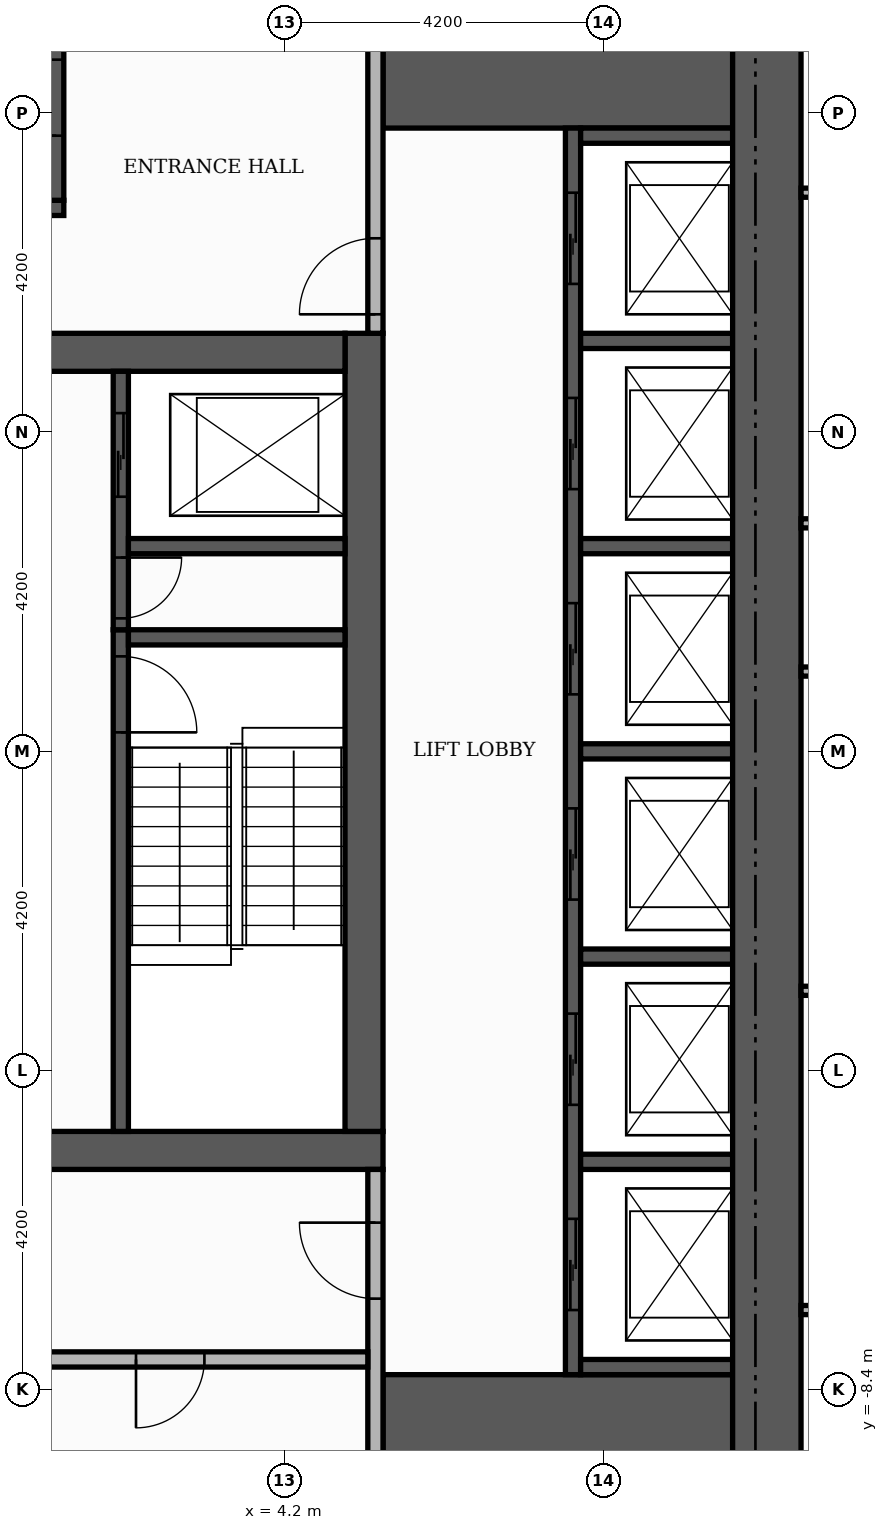
"""IFC4 building model, lengths in metres.
Left out: names, types, materials, properties, quantities, classifications, styles, units other than length and angle.
Written with IfcOpenShell. Run it as: python <this file> out.ifc"""

import sys

from ifc_helpers import new_model, si_unit, direction, frame, frame_2d, origin, place, context, subcontext, project, spatial, rectangle, extrude, element, fill, save


model = new_model("IFC4")
c1 = context("Model", 3, precision=1e-05, world=origin(), true_north=direction((0.0, 1.0)))
c2 = subcontext(c1, "Body", "Model", "MODEL_VIEW")
j1 = project(units=[si_unit("LENGTHUNIT", "METRE"), si_unit("PLANEANGLEUNIT", "RADIAN")], contexts=[c1])
p1 = place(None, origin())
s1 = spatial("IfcSite", under=j1, at=p1, CompositionType="ELEMENT")
p2 = place(p1, origin())
s2 = spatial("IfcBuilding", under=s1, at=p2, CompositionType="ELEMENT")
p3 = place(p2, frame((0.0, 0.0, 200.1)))
s3 = spatial("IfcBuildingStorey", under=s2, at=p3, CompositionType="ELEMENT", Elevation=200.1)
p4 = place(p3, frame((-5.5, -5.25, 0.0), z_axis=(0.0, 0.0, 1.0), x_axis=(1.0, 0.0, 0.0)))
e1 = element("IfcWall", 1, at=p4, inside=s3, PredefinedType="SHEAR", context=c2, shape_type="SweptSolid", body=[
    extrude(rectangle(XDim=11.0, YDim=0.5, at=frame_2d((5.5, 0.0))), origin(), (0.0, 0.0, 1.0), 3.48),
])
p5 = place(p4, frame((4.9, 0.0, 0.0)))
e2 = element("IfcOpeningElement", 2, at=p5, cuts=e1, PredefinedType="OPENING", context=c2, shape_type="SweptSolid", body=[
    extrude(rectangle(XDim=1.2, YDim=2.1, at=frame_2d((0.6, 1.05))), frame((0.0, 0.26, 0.0), z_axis=(0.0, -1.0, 0.0), x_axis=(1.0, 0.0, 0.0)), (0.0, 0.0, 1.0), 0.52),
])
p6 = place(p3, frame((5.25, -5.0, 0.0), z_axis=(0.0, 0.0, 1.0), x_axis=(0.0, 1.0, 0.0)))
e3 = element("IfcWall", 3, at=p6, inside=s3, PredefinedType="SHEAR", context=c2, shape_type="SweptSolid", body=[
    extrude(rectangle(XDim=10.5, YDim=0.5, at=frame_2d((5.25, 0.0))), origin(), (0.0, 0.0, 1.0), 3.48),
])
p7 = place(p3, frame((-5.0, 5.25, 0.0), z_axis=(0.0, 0.0, 1.0), x_axis=(1.0, 0.0, 0.0)))
e4 = element("IfcWall", 4, at=p7, inside=s3, PredefinedType="SHEAR", context=c2, shape_type="SweptSolid", body=[
    extrude(rectangle(XDim=10.0, YDim=0.5, at=frame_2d((5.0, 0.0))), origin(), (0.0, 0.0, 1.0), 3.48),
])
p8 = place(p7, frame((4.4, 0.0, 0.0)))
e5 = element("IfcOpeningElement", 5, at=p8, cuts=e4, PredefinedType="OPENING", context=c2, shape_type="SweptSolid", body=[
    extrude(rectangle(XDim=1.2, YDim=2.1, at=frame_2d((0.6, 1.05))), frame((0.0, 0.26, 0.0), z_axis=(0.0, -1.0, 0.0), x_axis=(1.0, 0.0, 0.0)), (0.0, 0.0, 1.0), 0.52),
])
for number, where, z_axis, x_axis in (
    (6, (5.5, -9.15, 0.0), (0.0, 0.0, 1.0), (1.0, 0.0, 0.0)),
    (7, (5.5, 9.15, 0.0), (0.0, 0.0, 1.0), (1.0, 0.0, 0.0)),
):
    element("IfcWall", number, at=place(p3, frame(where, z_axis=z_axis, x_axis=x_axis)), inside=s3, PredefinedType="SHEAR", context=c2, shape_type="SweptSolid", body=[
        extrude(rectangle(XDim=4.6, YDim=1.9, at=frame_2d((2.3, 0.0))), origin(), (0.0, 0.0, 1.0), 3.48),
    ])
p9 = place(p3, frame((2.05, -5.0, 0.0), z_axis=(0.0, 0.0, 1.0), x_axis=(0.0, 1.0, 0.0)))
e8 = element("IfcWall", 8, at=p9, inside=s3, PredefinedType="SHEAR", context=c2, shape_type="SweptSolid", body=[
    extrude(rectangle(XDim=6.6, YDim=0.2, at=frame_2d((3.3, 0.0))), origin(), (0.0, 0.0, 1.0), 3.48),
])
p10 = place(p9, frame((5.25, 0.0, 0.0)))
e9 = element("IfcOpeningElement", 9, at=p10, cuts=e8, PredefinedType="OPENING", context=c2, shape_type="SweptSolid", body=[
    extrude(rectangle(XDim=1.0, YDim=2.1, at=frame_2d((0.5, 1.05))), frame((0.0, 0.11, 0.0), z_axis=(0.0, -1.0, 0.0), x_axis=(1.0, 0.0, 0.0)), (0.0, 0.0, 1.0), 0.22),
])
p11 = place(p3, frame((2.15, 1.5, 0.0), z_axis=(0.0, 0.0, 1.0), x_axis=(1.0, 0.0, 0.0)))
e10 = element("IfcWall", 10, at=p11, inside=s3, PredefinedType="SHEAR", context=c2, shape_type="SweptSolid", body=[
    extrude(rectangle(XDim=2.85, YDim=0.2, at=frame_2d((1.425, 0.0))), origin(), (0.0, 0.0, 1.0), 3.48),
])
p12 = place(p3, frame((-5.5, 7.15, 0.0), z_axis=(0.0, 0.0, 1.0), x_axis=(1.0, 0.0, 0.0)))
e11 = element("IfcWall", 11, at=p12, inside=s3, PredefinedType="SHEAR", context=c2, shape_type="SweptSolid", body=[
    extrude(rectangle(XDim=6.8, YDim=0.2, at=frame_2d((3.4, 0.0))), origin(), (0.0, 0.0, 1.0), 3.48),
])
p13 = place(p3, frame((1.2, 7.25, 0.0), z_axis=(0.0, 0.0, 1.0), x_axis=(0.0, 1.0, 0.0)))
e12 = element("IfcWall", 12, at=p13, inside=s3, PredefinedType="SHEAR", context=c2, shape_type="SweptSolid", body=[
    extrude(rectangle(XDim=2.85, YDim=0.2, at=frame_2d((1.425, 0.0))), origin(), (0.0, 0.0, 1.0), 3.48),
])
p14 = place(p13, frame((0.85, 0.0, 0.0)))
e13 = element("IfcOpeningElement", 13, at=p14, cuts=e12, PredefinedType="OPENING", context=c2, shape_type="SweptSolid", body=[
    extrude(rectangle(XDim=1.0, YDim=2.1, at=frame_2d((0.5, 1.05))), frame((0.0, 0.11, 0.0), z_axis=(0.0, -1.0, 0.0), x_axis=(1.0, 0.0, 0.0)), (0.0, 0.0, 1.0), 0.22),
])
p15 = place(p3, frame((8.0, -8.2, 0.0), z_axis=(0.0, 0.0, 1.0), x_axis=(0.0, 1.0, 0.0)))
e14 = element("IfcWall", 14, at=p15, inside=s3, PredefinedType="SHEAR", context=c2, shape_type="SweptSolid", body=[
    extrude(rectangle(XDim=16.4, YDim=0.2, at=frame_2d((8.2, 0.0))), origin(), (0.0, 0.0, 1.0), 3.48),
])
p16 = place(p15, frame((0.85, 0.0, 0.0)))
e15 = element("IfcOpeningElement", 15, at=p16, cuts=e14, PredefinedType="OPENING", context=c2, shape_type="SweptSolid", body=[
    extrude(rectangle(XDim=1.2, YDim=2.1, at=frame_2d((0.6, 1.05))), frame((0.0, 0.11, 0.0), z_axis=(0.0, -1.0, 0.0), x_axis=(1.0, 0.0, 0.0)), (0.0, 0.0, 1.0), 0.22),
])
p17 = place(p15, frame((3.55, 0.0, 0.0)))
e16 = element("IfcOpeningElement", 16, at=p17, cuts=e14, PredefinedType="OPENING", context=c2, shape_type="SweptSolid", body=[
    extrude(rectangle(XDim=1.2, YDim=2.1, at=frame_2d((0.6, 1.05))), frame((0.0, 0.11, 0.0), z_axis=(0.0, -1.0, 0.0), x_axis=(1.0, 0.0, 0.0)), (0.0, 0.0, 1.0), 0.22),
])
p18 = place(p15, frame((6.25, 0.0, 0.0)))
e17 = element("IfcOpeningElement", 17, at=p18, cuts=e14, PredefinedType="OPENING", context=c2, shape_type="SweptSolid", body=[
    extrude(rectangle(XDim=1.2, YDim=2.1, at=frame_2d((0.6, 1.05))), frame((0.0, 0.11, 0.0), z_axis=(0.0, -1.0, 0.0), x_axis=(1.0, 0.0, 0.0)), (0.0, 0.0, 1.0), 0.22),
])
p19 = place(p15, frame((8.95, 0.0, 0.0)))
e18 = element("IfcOpeningElement", 18, at=p19, cuts=e14, PredefinedType="OPENING", context=c2, shape_type="SweptSolid", body=[
    extrude(rectangle(XDim=1.2, YDim=2.1, at=frame_2d((0.6, 1.05))), frame((0.0, 0.11, 0.0), z_axis=(0.0, -1.0, 0.0), x_axis=(1.0, 0.0, 0.0)), (0.0, 0.0, 1.0), 0.22),
])
p20 = place(p15, frame((11.65, 0.0, 0.0)))
e19 = element("IfcOpeningElement", 19, at=p20, cuts=e14, PredefinedType="OPENING", context=c2, shape_type="SweptSolid", body=[
    extrude(rectangle(XDim=1.2, YDim=2.1, at=frame_2d((0.6, 1.05))), frame((0.0, 0.11, 0.0), z_axis=(0.0, -1.0, 0.0), x_axis=(1.0, 0.0, 0.0)), (0.0, 0.0, 1.0), 0.22),
])
p21 = place(p15, frame((14.35, 0.0, 0.0)))
e20 = element("IfcOpeningElement", 20, at=p21, cuts=e14, PredefinedType="OPENING", context=c2, shape_type="SweptSolid", body=[
    extrude(rectangle(XDim=1.2, YDim=2.1, at=frame_2d((0.6, 1.05))), frame((0.0, 0.11, 0.0), z_axis=(0.0, -1.0, 0.0), x_axis=(1.0, 0.0, 0.0)), (0.0, 0.0, 1.0), 0.22),
])
for number, where, z_axis, x_axis in (
    (21, (8.1, -8.1, 0.0), (0.0, 0.0, 1.0), (1.0, 0.0, 0.0)),
    (22, (8.1, -5.4, 0.0), (0.0, 0.0, 1.0), (1.0, 0.0, 0.0)),
    (23, (8.1, -2.7, 0.0), (0.0, 0.0, 1.0), (1.0, 0.0, 0.0)),
    (24, (8.1, 0.0, 0.0), (0.0, 0.0, 1.0), (1.0, 0.0, 0.0)),
):
    element("IfcWall", number, at=place(p3, frame(where, z_axis=z_axis, x_axis=x_axis)), inside=s3, PredefinedType="SHEAR", context=c2, shape_type="SweptSolid", body=[
        extrude(rectangle(XDim=2.0, YDim=0.2, at=frame_2d((1.0, 0.0))), origin(), (0.0, 0.0, 1.0), 3.48),
    ])
p22 = place(p3, frame((2.05, 1.6, 0.0), z_axis=(0.0, 0.0, 1.0), x_axis=(0.0, 1.0, 0.0)))
e25 = element("IfcWall", 25, at=p22, inside=s3, PredefinedType="SHEAR", context=c2, shape_type="SweptSolid", body=[
    extrude(rectangle(XDim=3.4, YDim=0.2, at=frame_2d((1.7, 0.0))), origin(), (0.0, 0.0, 1.0), 3.48),
])
p23 = place(p22, frame((1.75, 0.0, 0.0)))
e26 = element("IfcOpeningElement", 26, at=p23, cuts=e25, PredefinedType="OPENING", context=c2, shape_type="SweptSolid", body=[
    extrude(rectangle(XDim=1.1, YDim=2.1, at=frame_2d((0.55, 1.05))), frame((0.0, 0.11, 0.0), z_axis=(0.0, -1.0, 0.0), x_axis=(1.0, 0.0, 0.0)), (0.0, 0.0, 1.0), 0.22),
])
p24 = place(p22, frame((0.15, 0.0, 0.0)))
e27 = element("IfcOpeningElement", 27, at=p24, cuts=e25, PredefinedType="OPENING", context=c2, shape_type="SweptSolid", body=[
    extrude(rectangle(XDim=0.8, YDim=2.1, at=frame_2d((0.4, 1.05))), frame((0.0, 0.11, 0.0), z_axis=(0.0, -1.0, 0.0), x_axis=(1.0, 0.0, 0.0)), (0.0, 0.0, 1.0), 0.22),
])
p25 = place(p3, frame((2.15, 2.7, 0.0), z_axis=(0.0, 0.0, 1.0), x_axis=(1.0, 0.0, 0.0)))
e28 = element("IfcWall", 28, at=p25, inside=s3, PredefinedType="SHEAR", context=c2, shape_type="SweptSolid", body=[
    extrude(rectangle(XDim=2.85, YDim=0.2, at=frame_2d((1.425, 0.0))), origin(), (0.0, 0.0, 1.0), 3.48),
])
for number, where, z_axis, x_axis in (
    (29, (8.1, 2.7, 0.0), (0.0, 0.0, 1.0), (1.0, 0.0, 0.0)),
    (30, (8.1, 5.4, 0.0), (0.0, 0.0, 1.0), (1.0, 0.0, 0.0)),
    (31, (8.1, 8.1, 0.0), (0.0, 0.0, 1.0), (1.0, 0.0, 0.0)),
):
    element("IfcWall", number, at=place(p3, frame(where, z_axis=z_axis, x_axis=x_axis)), inside=s3, PredefinedType="SHEAR", context=c2, shape_type="SweptSolid", body=[
        extrude(rectangle(XDim=2.0, YDim=0.2, at=frame_2d((1.0, 0.0))), origin(), (0.0, 0.0, 1.0), 3.48),
    ])
p26 = place(p3, frame((10.55, -10.1, 0.0), z_axis=(0.0, 0.0, 1.0), x_axis=(0.0, 1.0, 0.0)))
e32 = element("IfcWall", 32, at=p26, inside=s3, PredefinedType="SHEAR", context=c2, shape_type="SweptSolid", body=[
    extrude(rectangle(XDim=20.2, YDim=0.9, at=frame_2d((10.1, 0.0))), origin(), (0.0, 0.0, 1.0), 3.48),
])
p27 = place(p3, frame((5.4, -10.1, 0.0), z_axis=(0.0, 0.0, 1.0), x_axis=(0.0, 1.0, 0.0)))
e33 = element("IfcWall", 33, at=p27, inside=s3, PredefinedType="PARTITIONING", context=c2, shape_type="SweptSolid", body=[
    extrude(rectangle(XDim=4.6, YDim=0.2, at=frame_2d((2.3, 0.0))), origin(), (0.0, 0.0, 1.0), 3.48),
])
p28 = place(p27, frame((2.9, 0.0, 0.0)))
e34 = element("IfcOpeningElement", 34, at=p28, cuts=e33, PredefinedType="OPENING", context=c2, shape_type="SweptSolid", body=[
    extrude(rectangle(XDim=1.0, YDim=2.1, at=frame_2d((0.5, 1.05))), frame((0.0, 0.11, 0.0), z_axis=(0.0, -1.0, 0.0), x_axis=(1.0, 0.0, 0.0)), (0.0, 0.0, 1.0), 0.22),
])
p29 = place(p3, frame((0.1, -8.0, 0.0), z_axis=(0.0, 0.0, 1.0), x_axis=(1.0, 0.0, 0.0)))
e35 = element("IfcWall", 35, at=p29, inside=s3, PredefinedType="PARTITIONING", context=c2, shape_type="SweptSolid", body=[
    extrude(rectangle(XDim=5.2, YDim=0.2, at=frame_2d((2.6, 0.0))), origin(), (0.0, 0.0, 1.0), 3.48),
])
p30 = place(p29, frame((2.15, 0.0, 0.0)))
e36 = element("IfcOpeningElement", 36, at=p30, cuts=e35, PredefinedType="OPENING", context=c2, shape_type="SweptSolid", body=[
    extrude(rectangle(XDim=0.9, YDim=2.1, at=frame_2d((0.45, 1.05))), frame((0.0, 0.11, 0.0), z_axis=(0.0, -1.0, 0.0), x_axis=(1.0, 0.0, 0.0)), (0.0, 0.0, 1.0), 0.22),
])
p31 = place(p3, frame((5.4, 5.5, 0.0), z_axis=(0.0, 0.0, 1.0), x_axis=(0.0, 1.0, 0.0)))
e37 = element("IfcWall", 37, at=p31, inside=s3, PredefinedType="PARTITIONING", context=c2, shape_type="SweptSolid", body=[
    extrude(rectangle(XDim=4.6, YDim=0.2, at=frame_2d((2.3, 0.0))), origin(), (0.0, 0.0, 1.0), 3.48),
])
p32 = place(p31, frame((0.25, 0.0, 0.0)))
e38 = element("IfcOpeningElement", 38, at=p32, cuts=e37, PredefinedType="OPENING", context=c2, shape_type="SweptSolid", body=[
    extrude(rectangle(XDim=1.0, YDim=2.1, at=frame_2d((0.5, 1.05))), frame((0.0, 0.11, 0.0), z_axis=(0.0, -1.0, 0.0), x_axis=(1.0, 0.0, 0.0)), (0.0, 0.0, 1.0), 0.22),
])
p33 = place(p3, frame((11.0, -7.35, 0.0), z_axis=(0.0, 0.0, 1.0), x_axis=(1.0, 0.0, 0.0)))
e39 = element("IfcWall", 39, at=p33, inside=s3, PredefinedType="PARTITIONING", context=c2, shape_type="SweptSolid", body=[
    extrude(rectangle(XDim=8.22, YDim=0.12, at=frame_2d((4.11, 0.0))), origin(), (0.0, 0.0, 1.0), 3.48),
])
p34 = place(p33, frame((3.66, 0.0, 0.0)))
e40 = element("IfcOpeningElement", 40, at=p34, cuts=e39, PredefinedType="OPENING", context=c2, shape_type="SweptSolid", body=[
    extrude(rectangle(XDim=0.9, YDim=2.1, at=frame_2d((0.45, 1.05))), frame((0.0, 0.07, 0.0), z_axis=(0.0, -1.0, 0.0), x_axis=(1.0, 0.0, 0.0)), (0.0, 0.0, 1.0), 0.14),
])
for number, where, z_axis, x_axis in (
    (41, (11.0, -3.15, 0.0), (0.0, 0.0, 1.0), (1.0, 0.0, 0.0)),
    (42, (11.0, 1.05, 0.0), (0.0, 0.0, 1.0), (1.0, 0.0, 0.0)),
    (43, (11.0, 3.0, 0.0), (0.0, 0.0, 1.0), (1.0, 0.0, 0.0)),
    (44, (11.0, 7.35, 0.0), (0.0, 0.0, 1.0), (1.0, 0.0, 0.0)),
):
    element("IfcWall", number, at=place(p3, frame(where, z_axis=z_axis, x_axis=x_axis)), inside=s3, PredefinedType="PARTITIONING", context=c2, shape_type="SweptSolid", body=[
        extrude(rectangle(XDim=8.22, YDim=0.12, at=frame_2d((4.11, 0.0))), origin(), (0.0, 0.0, 1.0), 3.48),
    ])
p35 = place(p16, origin())
e45 = element("IfcDoor", 45, at=p35, inside=s3, OperationType="SLIDING_TO_LEFT", PredefinedType="DOOR", context=c2, shape_type="SweptSolid", body=[
    extrude(rectangle(XDim=1.2, YDim=2.1, at=frame_2d((0.6, 1.05))), frame((0.0, 0.025, 0.0), z_axis=(0.0, -1.0, 0.0), x_axis=(1.0, 0.0, 0.0)), (0.0, 0.0, 1.0), 0.05),
])
fill(e15, e45)
p36 = place(p17, origin())
e46 = element("IfcDoor", 46, at=p36, inside=s3, OperationType="SLIDING_TO_LEFT", PredefinedType="DOOR", context=c2, shape_type="SweptSolid", body=[
    extrude(rectangle(XDim=1.2, YDim=2.1, at=frame_2d((0.6, 1.05))), frame((0.0, 0.025, 0.0), z_axis=(0.0, -1.0, 0.0), x_axis=(1.0, 0.0, 0.0)), (0.0, 0.0, 1.0), 0.05),
])
fill(e16, e46)
p37 = place(p18, origin())
e47 = element("IfcDoor", 47, at=p37, inside=s3, OperationType="SLIDING_TO_LEFT", PredefinedType="DOOR", context=c2, shape_type="SweptSolid", body=[
    extrude(rectangle(XDim=1.2, YDim=2.1, at=frame_2d((0.6, 1.05))), frame((0.0, 0.025, 0.0), z_axis=(0.0, -1.0, 0.0), x_axis=(1.0, 0.0, 0.0)), (0.0, 0.0, 1.0), 0.05),
])
fill(e17, e47)
p38 = place(p19, origin())
e48 = element("IfcDoor", 48, at=p38, inside=s3, OperationType="SLIDING_TO_LEFT", PredefinedType="DOOR", context=c2, shape_type="SweptSolid", body=[
    extrude(rectangle(XDim=1.2, YDim=2.1, at=frame_2d((0.6, 1.05))), frame((0.0, 0.025, 0.0), z_axis=(0.0, -1.0, 0.0), x_axis=(1.0, 0.0, 0.0)), (0.0, 0.0, 1.0), 0.05),
])
fill(e18, e48)
p39 = place(p20, origin())
e49 = element("IfcDoor", 49, at=p39, inside=s3, OperationType="SLIDING_TO_LEFT", PredefinedType="DOOR", context=c2, shape_type="SweptSolid", body=[
    extrude(rectangle(XDim=1.2, YDim=2.1, at=frame_2d((0.6, 1.05))), frame((0.0, 0.025, 0.0), z_axis=(0.0, -1.0, 0.0), x_axis=(1.0, 0.0, 0.0)), (0.0, 0.0, 1.0), 0.05),
])
fill(e19, e49)
p40 = place(p21, origin())
e50 = element("IfcDoor", 50, at=p40, inside=s3, OperationType="SLIDING_TO_LEFT", PredefinedType="DOOR", context=c2, shape_type="SweptSolid", body=[
    extrude(rectangle(XDim=1.2, YDim=2.1, at=frame_2d((0.6, 1.05))), frame((0.0, 0.025, 0.0), z_axis=(0.0, -1.0, 0.0), x_axis=(1.0, 0.0, 0.0)), (0.0, 0.0, 1.0), 0.05),
])
fill(e20, e50)
p41 = place(p23, origin())
e51 = element("IfcDoor", 51, at=p41, inside=s3, OperationType="SLIDING_TO_LEFT", PredefinedType="DOOR", context=c2, shape_type="SweptSolid", body=[
    extrude(rectangle(XDim=1.1, YDim=2.1, at=frame_2d((0.55, 1.05))), frame((0.0, 0.025, 0.0), z_axis=(0.0, -1.0, 0.0), x_axis=(1.0, 0.0, 0.0)), (0.0, 0.0, 1.0), 0.05),
])
fill(e26, e51)
p42 = place(p10, frame((1.0, 0.0, 0.0), z_axis=(0.0, 0.0, 1.0), x_axis=(-1.0, 0.0, 0.0)))
e52 = element("IfcDoor", 52, at=p42, inside=s3, OperationType="SINGLE_SWING_LEFT", PredefinedType="DOOR", context=c2, shape_type="SweptSolid", body=[
    extrude(rectangle(XDim=1.0, YDim=2.1, at=frame_2d((0.5, 1.05))), frame((0.0, 0.025, 0.0), z_axis=(0.0, -1.0, 0.0), x_axis=(1.0, 0.0, 0.0)), (0.0, 0.0, 1.0), 0.05),
])
fill(e9, e52)
p43 = place(p24, frame((0.8, 0.0, 0.0), z_axis=(0.0, 0.0, 1.0), x_axis=(-1.0, 0.0, 0.0)))
e53 = element("IfcDoor", 53, at=p43, inside=s3, OperationType="SINGLE_SWING_RIGHT", PredefinedType="DOOR", context=c2, shape_type="SweptSolid", body=[
    extrude(rectangle(XDim=0.8, YDim=2.1, at=frame_2d((0.4, 1.05))), frame((0.0, 0.025, 0.0), z_axis=(0.0, -1.0, 0.0), x_axis=(1.0, 0.0, 0.0)), (0.0, 0.0, 1.0), 0.05),
])
fill(e27, e53)
p44 = place(p14, origin())
e54 = element("IfcDoor", 54, at=p44, inside=s3, OperationType="SINGLE_SWING_LEFT", PredefinedType="DOOR", context=c2, shape_type="SweptSolid", body=[
    extrude(rectangle(XDim=1.0, YDim=2.1, at=frame_2d((0.5, 1.05))), frame((0.0, 0.025, 0.0), z_axis=(0.0, -1.0, 0.0), x_axis=(1.0, 0.0, 0.0)), (0.0, 0.0, 1.0), 0.05),
])
fill(e13, e54)
p45 = place(p32, origin())
e55 = element("IfcDoor", 55, at=p45, inside=s3, OperationType="SINGLE_SWING_LEFT", PredefinedType="DOOR", context=c2, shape_type="SweptSolid", body=[
    extrude(rectangle(XDim=1.0, YDim=2.1, at=frame_2d((0.5, 1.05))), frame((0.0, 0.025, 0.0), z_axis=(0.0, -1.0, 0.0), x_axis=(1.0, 0.0, 0.0)), (0.0, 0.0, 1.0), 0.05),
])
fill(e38, e55)
p46 = place(p28, origin())
e56 = element("IfcDoor", 56, at=p46, inside=s3, OperationType="SINGLE_SWING_RIGHT", PredefinedType="DOOR", context=c2, shape_type="SweptSolid", body=[
    extrude(rectangle(XDim=1.0, YDim=2.1, at=frame_2d((0.5, 1.05))), frame((0.0, 0.025, 0.0), z_axis=(0.0, -1.0, 0.0), x_axis=(1.0, 0.0, 0.0)), (0.0, 0.0, 1.0), 0.05),
])
fill(e34, e56)
p47 = place(p30, frame((0.9, 0.0, 0.0), z_axis=(0.0, 0.0, 1.0), x_axis=(-1.0, 0.0, 0.0)))
e57 = element("IfcDoor", 57, at=p47, inside=s3, OperationType="SINGLE_SWING_LEFT", PredefinedType="DOOR", context=c2, shape_type="SweptSolid", body=[
    extrude(rectangle(XDim=0.9, YDim=2.1, at=frame_2d((0.45, 1.05))), frame((0.0, 0.025, 0.0), z_axis=(0.0, -1.0, 0.0), x_axis=(1.0, 0.0, 0.0)), (0.0, 0.0, 1.0), 0.05),
])
fill(e36, e57)
save(model, sys.argv[1])
